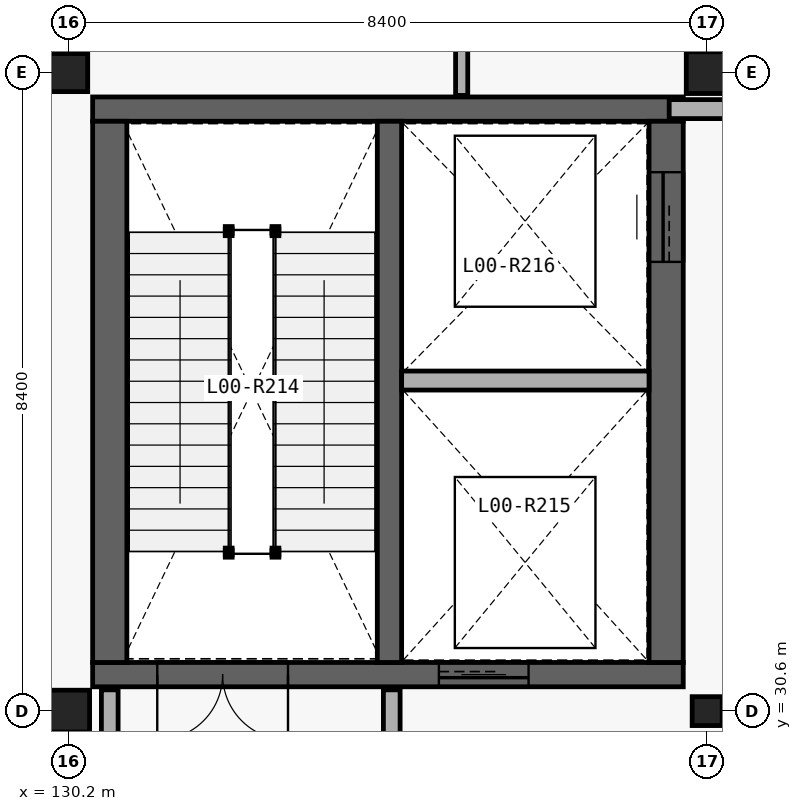
"""IFC4 building model, lengths in metres.
Left out: names, types, materials, properties, quantities, classifications, styles, units other than length and angle.
Written with IfcOpenShell. Run it as: python <this file> out.ifc"""

import sys

from ifc_helpers import new_model, si_unit, direction, frame, frame_2d, origin_with_axes, origin_2d_with_axis, place, context, subcontext, project, spatial, rectangle, i_section, extrude, element, fill, save


model = new_model("IFC4")
c1 = context("Model", 3, precision=1e-05, world=origin_with_axes(), true_north=direction((0.0, 1.0)))
c2 = subcontext(c1, "Body", "Model", "MODEL_VIEW")
j1 = project(units=[si_unit("LENGTHUNIT", "METRE"), si_unit("PLANEANGLEUNIT", "RADIAN")], contexts=[c1])
p1 = place(None, origin_with_axes())
s1 = spatial("IfcSite", under=j1, at=p1, CompositionType="ELEMENT")
p2 = place(p1, origin_with_axes())
s2 = spatial("IfcBuilding", under=s1, at=p2, CompositionType="ELEMENT")
p3 = place(p2, origin_with_axes())
s3 = spatial("IfcBuildingStorey", under=s2, at=p3, CompositionType="ELEMENT", Elevation=0.0)
p4 = place(None, frame((130.515, 31.08, 0.0), z_axis=(0.0, 0.0, 1.0), x_axis=(1.0, 0.0, 0.0)))
e1 = element("IfcWall", 1, at=p4, inside=s3, PredefinedType="SHEAR", context=c2, shape_type="SweptSolid", body=[
    extrude(rectangle(XDim=7.77, YDim=0.32, at=frame_2d((3.885, 0.0), x_axis=(1.0, 0.0))), origin_with_axes(), (0.0, 0.0, 1.0), 5.4),
])
p5 = place(None, frame((132.225, 31.08, 0.0), z_axis=(0.0, 0.0, 1.0), x_axis=(1.0, 0.0, 0.0)))
e2 = element("IfcOpeningElement", 2, at=p5, cuts=e1, PredefinedType="OPENING", context=c2, shape_type="SweptSolid", body=[
    extrude(rectangle(XDim=1.72, YDim=2.18, at=frame_2d((0.0, 1.09), x_axis=(1.0, 0.0))), frame((0.0, 0.17, 0.0), z_axis=(0.0, -1.0, 0.0), x_axis=(1.0, 0.0, 0.0)), (0.0, 0.0, 1.0), 0.34),
])
p6 = place(None, frame((135.66, 31.08, 0.0), z_axis=(0.0, 0.0, 1.0), x_axis=(1.0, 0.0, 0.0)))
e3 = element("IfcOpeningElement", 3, at=p6, cuts=e1, PredefinedType="OPENING", context=c2, shape_type="SweptSolid", body=[
    extrude(rectangle(XDim=1.18, YDim=2.24, at=frame_2d((0.0, 1.12), x_axis=(1.0, 0.0))), frame((0.0, 0.17, 0.0), z_axis=(0.0, -1.0, 0.0), x_axis=(1.0, 0.0, 0.0)), (0.0, 0.0, 1.0), 0.34),
])
p7 = place(None, frame((138.285, 38.52, 0.0), z_axis=(0.0, 0.0, 1.0), x_axis=(-1.0, 0.0, 0.0)))
e4 = element("IfcWall", 4, at=p7, inside=s3, PredefinedType="SHEAR", context=c2, shape_type="SweptSolid", body=[
    extrude(rectangle(XDim=7.77, YDim=0.32, at=frame_2d((3.885, 0.0), x_axis=(1.0, 0.0))), origin_with_axes(), (0.0, 0.0, 1.0), 5.4),
])
p8 = place(None, frame((138.06, 31.24, 0.0), z_axis=(0.0, 0.0, 1.0), x_axis=(0.0, 1.0, 0.0)))
e5 = element("IfcWall", 5, at=p8, inside=s3, PredefinedType="SHEAR", context=c2, shape_type="SweptSolid", body=[
    extrude(rectangle(XDim=7.12, YDim=0.45, at=frame_2d((3.56, 0.0), x_axis=(1.0, 0.0))), origin_with_axes(), (0.0, 0.0, 1.0), 5.4),
])
p9 = place(None, frame((138.06, 37.1, 0.0), z_axis=(0.0, 0.0, 1.0), x_axis=(0.0, 1.0, 0.0)))
e6 = element("IfcOpeningElement", 6, at=p9, cuts=e5, PredefinedType="OPENING", context=c2, shape_type="SweptSolid", body=[
    extrude(rectangle(XDim=1.18, YDim=2.24, at=frame_2d((0.0, 1.12), x_axis=(1.0, 0.0))), frame((0.0, 0.235, 0.0), z_axis=(0.0, -1.0, 0.0), x_axis=(1.0, 0.0, 0.0)), (0.0, 0.0, 1.0), 0.47),
])
p10 = place(None, frame((130.74, 38.36, 0.0), z_axis=(0.0, 0.0, 1.0), x_axis=(0.0, -1.0, 0.0)))
e7 = element("IfcWall", 7, at=p10, inside=s3, PredefinedType="SHEAR", context=c2, shape_type="SweptSolid", body=[
    extrude(rectangle(XDim=7.12, YDim=0.45, at=frame_2d((3.56, 0.0), x_axis=(1.0, 0.0))), origin_with_axes(), (0.0, 0.0, 1.0), 5.4),
])
p11 = place(None, frame((134.42, 31.24, 0.0), z_axis=(0.0, 0.0, 1.0), x_axis=(0.0, 1.0, 0.0)))
e8 = element("IfcWall", 8, at=p11, inside=s3, PredefinedType="SHEAR", context=c2, shape_type="SweptSolid", body=[
    extrude(rectangle(XDim=7.12, YDim=0.32, at=frame_2d((3.56, 0.0), x_axis=(1.0, 0.0))), origin_with_axes(), (0.0, 0.0, 1.0), 5.4),
])
p12 = place(None, frame((134.58, 34.949, 0.0), z_axis=(0.0, 0.0, 1.0), x_axis=(1.0, 0.0, 0.0)))
e9 = element("IfcWall", 9, at=p12, inside=s3, PredefinedType="PARTITIONING", context=c2, shape_type="SweptSolid", body=[
    extrude(rectangle(XDim=3.255, YDim=0.25, at=frame_2d((1.627, 0.0), x_axis=(1.0, 0.0))), origin_with_axes(), (0.0, 0.0, 1.0), 5.08),
])
p13 = place(None, frame((138.1, 38.52, 0.0), z_axis=(0.0, 0.0, 1.0), x_axis=(1.0, 0.0, 0.0)))
e10 = element("IfcWall", 10, at=p13, inside=s3, PredefinedType="PARTITIONING", context=c2, shape_type="SweptSolid", body=[
    extrude(rectangle(XDim=3.36, YDim=0.25, at=frame_2d((1.68, 0.0), x_axis=(1.0, 0.0))), origin_with_axes(), (0.0, 0.0, 1.0), 5.08),
])
for number, where, z_axis, x_axis in (
    (11, (130.74, 29.62, 0.0), (0.0, 0.0, 1.0), (0.0, 1.0, 0.0)),
    (12, (134.45, 29.62, 0.0), (0.0, 0.0, 1.0), (0.0, 1.0, 0.0)),
):
    element("IfcWall", number, at=place(None, frame(where, z_axis=z_axis, x_axis=x_axis)), inside=s3, PredefinedType="PARTITIONING", context=c2, shape_type="SweptSolid", body=[
        extrude(rectangle(XDim=1.26, YDim=0.22, at=frame_2d((0.63, 0.0), x_axis=(1.0, 0.0))), origin_with_axes(), (0.0, 0.0, 1.0), 5.08),
    ])
p14 = place(None, frame((135.37, 38.7, 0.0), z_axis=(0.0, 0.0, 1.0), x_axis=(0.0, 1.0, 0.0)))
e13 = element("IfcWall", 13, at=p14, inside=s3, PredefinedType="PARTITIONING", context=c2, shape_type="SweptSolid", body=[
    extrude(rectangle(XDim=22.96, YDim=0.16, at=frame_2d((11.48, 0.0), x_axis=(1.0, 0.0))), origin_with_axes(), (0.0, 0.0, 1.0), 5.08),
])
p15 = place(None, frame((130.2, 30.6, 0.0), z_axis=(0.0, 0.0, 1.0), x_axis=(1.0, 0.0, 0.0)))
e14 = element("IfcColumn", 14, at=p15, inside=s3, PredefinedType="COLUMN", context=c2, shape_type="SweptSolid", body=[
    extrude(i_section(OverallWidth=0.55, OverallDepth=0.55, WebThickness=0.025, FlangeThickness=0.042, at=origin_2d_with_axis()), origin_with_axes(), (0.0, 0.0, 1.0), 5.4),
])
p16 = place(None, frame((130.2, 39.0, 0.0), z_axis=(0.0, 0.0, 1.0), x_axis=(1.0, 0.0, 0.0)))
e15 = element("IfcColumn", 15, at=p16, inside=s3, PredefinedType="COLUMN", context=c2, shape_type="SweptSolid", body=[
    extrude(i_section(OverallWidth=0.5, OverallDepth=0.5, WebThickness=0.022, FlangeThickness=0.036, at=origin_2d_with_axis()), origin_with_axes(), (0.0, 0.0, 1.0), 5.4),
])
p17 = place(None, frame((138.6, 30.6, 0.0), z_axis=(0.0, 0.0, 1.0), x_axis=(1.0, 0.0, 0.0)))
e16 = element("IfcColumn", 16, at=p17, inside=s3, PredefinedType="COLUMN", context=c2, shape_type="SweptSolid", body=[
    extrude(i_section(OverallWidth=0.395, OverallDepth=0.38, WebThickness=0.019, FlangeThickness=0.03, at=origin_2d_with_axis()), origin_with_axes(), (0.0, 0.0, 1.0), 5.4),
])
p18 = place(None, frame((138.6, 39.0, 0.0), z_axis=(0.0, 0.0, 1.0), x_axis=(1.0, 0.0, 0.0)))
e17 = element("IfcColumn", 17, at=p18, inside=s3, PredefinedType="COLUMN", context=c2, shape_type="SweptSolid", body=[
    extrude(i_section(OverallWidth=0.55, OverallDepth=0.55, WebThickness=0.025, FlangeThickness=0.042, at=origin_2d_with_axis()), origin_with_axes(), (0.0, 0.0, 1.0), 5.4),
])
p19 = place(None, frame((132.225, 31.08, 0.0), z_axis=(0.0, 0.0, 1.0), x_axis=(-1.0, 0.0, 0.0)))
e18 = element("IfcDoor", 18, at=p19, inside=s3, OperationType="DOUBLE_DOOR_SINGLE_SWING", PredefinedType="DOOR", context=c2, shape_type="SweptSolid", body=[
    extrude(rectangle(XDim=1.72, YDim=2.18, at=frame_2d((0.0, 1.09), x_axis=(1.0, 0.0))), frame((0.0, 0.04, 0.0), z_axis=(0.0, -1.0, 0.0), x_axis=(1.0, 0.0, 0.0)), (0.0, 0.0, 1.0), 0.08),
])
fill(e2, e18)
p20 = place(None, frame((135.66, 31.08, 0.0), z_axis=(0.0, 0.0, 1.0), x_axis=(-1.0, 0.0, 0.0)))
e19 = element("IfcDoor", 19, at=p20, inside=s3, OperationType="SLIDING_TO_LEFT", PredefinedType="DOOR", context=c2, shape_type="SweptSolid", body=[
    extrude(rectangle(XDim=1.18, YDim=2.24, at=frame_2d((0.0, 1.12), x_axis=(1.0, 0.0))), frame((0.0, 0.04, 0.0), z_axis=(0.0, -1.0, 0.0), x_axis=(1.0, 0.0, 0.0)), (0.0, 0.0, 1.0), 0.08),
])
fill(e3, e19)
p21 = place(None, frame((138.06, 37.1, 0.0), z_axis=(0.0, 0.0, 1.0), x_axis=(0.0, 1.0, 0.0)))
e20 = element("IfcDoor", 20, at=p21, inside=s3, OperationType="SLIDING_TO_LEFT", PredefinedType="DOOR", context=c2, shape_type="SweptSolid", body=[
    extrude(rectangle(XDim=1.18, YDim=2.24, at=frame_2d((0.0, 1.12), x_axis=(1.0, 0.0))), frame((0.0, 0.04, 0.0), z_axis=(0.0, -1.0, 0.0), x_axis=(1.0, 0.0, 0.0)), (0.0, 0.0, 1.0), 0.08),
])
fill(e6, e20)
save(model, sys.argv[1])
